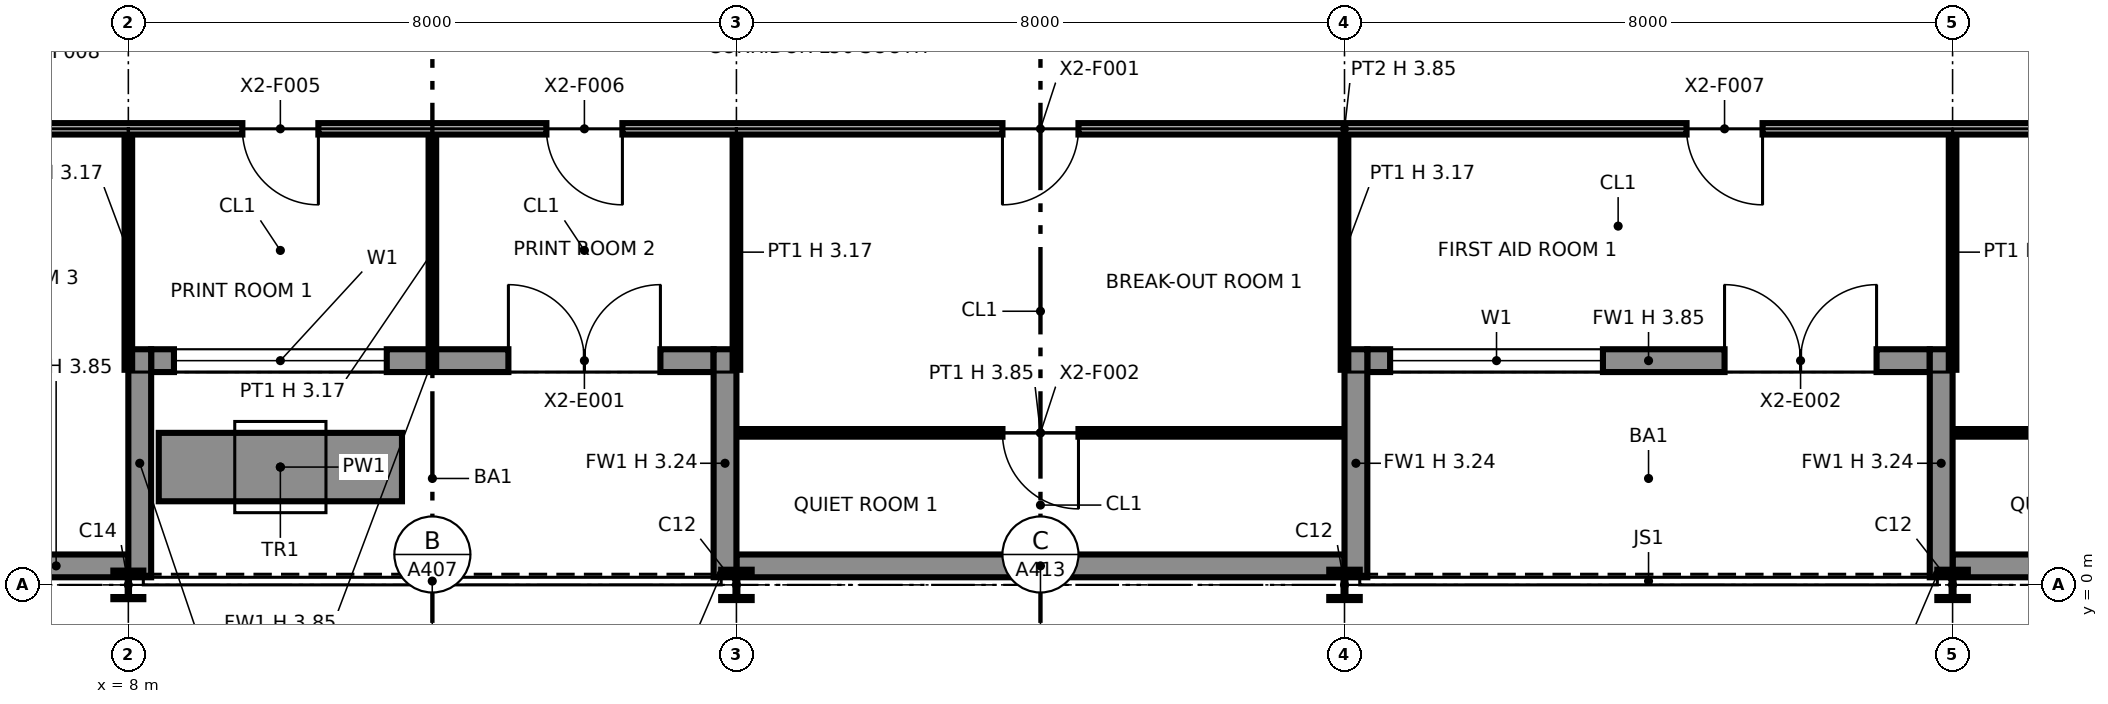
"""IFC4 building model, lengths in metres.
Left out: names, types, materials, properties, quantities, classifications, styles, units other than length and angle.
Written with IfcOpenShell. Run it as: python <this file> out.ifc"""

import sys

from ifc_helpers import new_model, si_unit, direction, frame, frame_2d, origin, origin_2d, place, context, subcontext, project, spatial, rectangle, i_section, extrude, element, fill, save


model = new_model("IFC4")
c1 = context("Model", 3, precision=1e-05, world=origin(), true_north=direction((0.0, 1.0)))
c2 = subcontext(c1, "Body", "Model", "MODEL_VIEW")
j1 = project(units=[si_unit("LENGTHUNIT", "METRE"), si_unit("PLANEANGLEUNIT", "RADIAN")], contexts=[c1])
p1 = place(None, origin())
s1 = spatial("IfcSite", under=j1, at=p1, CompositionType="ELEMENT")
p2 = place(p1, origin())
s2 = spatial("IfcBuilding", under=s1, at=p2, CompositionType="ELEMENT")
p3 = place(p2, frame((0.0, 0.0, 259.0)))
s3 = spatial("IfcBuildingStorey", under=s2, at=p3, CompositionType="ELEMENT", Elevation=259.0)
p4 = place(p3, frame((8.0, 0.0, 0.0), z_axis=(0.0, 0.0, 1.0), x_axis=(1.0, 0.0, 0.0)))
e1 = element("IfcColumn", 1, at=p4, inside=s3, PredefinedType="COLUMN", context=c2, shape_type="SweptSolid", body=[
    extrude(i_section(OverallWidth=0.394, OverallDepth=0.376, WebThickness=0.017, FlangeThickness=0.028, at=origin_2d()), origin(), (0.0, 0.0, 1.0), 3.85),
])
for number, where, z_axis, x_axis in (
    (2, (16.0, 0.0, 0.0), (0.0, 0.0, 1.0), (1.0, 0.0, 0.0)),
    (3, (24.0, 0.0, 0.0), (0.0, 0.0, 1.0), (1.0, 0.0, 0.0)),
    (4, (32.0, 0.0, 0.0), (0.0, 0.0, 1.0), (1.0, 0.0, 0.0)),
):
    element("IfcColumn", number, at=place(p3, frame(where, z_axis=z_axis, x_axis=x_axis)), inside=s3, PredefinedType="COLUMN", context=c2, shape_type="SweptSolid", body=[
        extrude(i_section(OverallWidth=0.401, OverallDepth=0.399, WebThickness=0.025, FlangeThickness=0.04, at=origin_2d()), origin(), (0.0, 0.0, 1.0), 3.85),
    ])
p5 = place(p3, frame((6.1, 0.25, 0.0), z_axis=(0.0, 0.0, 1.0), x_axis=(1.0, 0.0, 0.0)))
e5 = element("IfcWall", 5, at=p5, inside=s3, PredefinedType="SOLIDWALL", context=c2, shape_type="SweptSolid", body=[
    extrude(rectangle(XDim=1.9, YDim=0.3, at=frame_2d((0.95, 0.0))), origin(), (0.0, 0.0, 1.0), 3.85),
])
p6 = place(p3, frame((8.3, 2.95, 0.0), z_axis=(0.0, 0.0, 1.0), x_axis=(1.0, 0.0, 0.0)))
e6 = element("IfcWall", 6, at=p6, inside=s3, PredefinedType="SOLIDWALL", context=c2, shape_type="SweptSolid", body=[
    extrude(rectangle(XDim=7.4, YDim=0.3, at=frame_2d((3.7, 0.0))), origin(), (0.0, 0.0, 1.0), 3.85),
])
p7 = place(p6, frame((0.3, 0.0, 0.9)))
e7 = element("IfcOpeningElement", 7, at=p7, cuts=e6, PredefinedType="OPENING", context=c2, shape_type="SweptSolid", body=[
    extrude(rectangle(XDim=2.8, YDim=2.2, at=frame_2d((1.4, 1.1))), frame((0.0, 0.16, 0.0), z_axis=(0.0, -1.0, 0.0), x_axis=(1.0, 0.0, 0.0)), (0.0, 0.0, 1.0), 0.32),
])
p8 = place(p6, frame((4.7, 0.0, 0.0)))
e8 = element("IfcOpeningElement", 8, at=p8, cuts=e6, PredefinedType="OPENING", context=c2, shape_type="SweptSolid", body=[
    extrude(rectangle(XDim=2.0, YDim=2.4, at=frame_2d((1.0, 1.2))), frame((0.0, 0.16, 0.0), z_axis=(0.0, -1.0, 0.0), x_axis=(1.0, 0.0, 0.0)), (0.0, 0.0, 1.0), 0.32),
])
p9 = place(p3, frame((8.15, 0.1, 0.0), z_axis=(0.0, 0.0, 1.0), x_axis=(0.0, 1.0, 0.0)))
e9 = element("IfcWall", 9, at=p9, inside=s3, PredefinedType="SOLIDWALL", context=c2, shape_type="SweptSolid", body=[
    extrude(rectangle(XDim=3.0, YDim=0.3, at=frame_2d((1.5, 0.0))), origin(), (0.0, 0.0, 1.0), 3.171),
])
p10 = place(p3, frame((15.85, 0.1, 0.0), z_axis=(0.0, 0.0, 1.0), x_axis=(0.0, 1.0, 0.0)))
e10 = element("IfcWall", 10, at=p10, inside=s3, PredefinedType="SOLIDWALL", context=c2, shape_type="SweptSolid", body=[
    extrude(rectangle(XDim=3.0, YDim=0.3, at=frame_2d((1.5, 0.0))), origin(), (0.0, 0.0, 1.0), 3.237),
])
p11 = place(p3, frame((16.0, 0.25, 0.0), z_axis=(0.0, 0.0, 1.0), x_axis=(1.0, 0.0, 0.0)))
e11 = element("IfcWall", 11, at=p11, inside=s3, PredefinedType="SOLIDWALL", context=c2, shape_type="SweptSolid", body=[
    extrude(rectangle(XDim=8.0, YDim=0.3, at=frame_2d((4.0, 0.0))), origin(), (0.0, 0.0, 1.0), 3.85),
])
p12 = place(p3, frame((24.3, 2.95, 0.0), z_axis=(0.0, 0.0, 1.0), x_axis=(1.0, 0.0, 0.0)))
e12 = element("IfcWall", 12, at=p12, inside=s3, PredefinedType="SOLIDWALL", context=c2, shape_type="SweptSolid", body=[
    extrude(rectangle(XDim=7.4, YDim=0.3, at=frame_2d((3.7, 0.0))), origin(), (0.0, 0.0, 1.0), 3.85),
])
p13 = place(p12, frame((0.3, 0.0, 0.9)))
e13 = element("IfcOpeningElement", 13, at=p13, cuts=e12, PredefinedType="OPENING", context=c2, shape_type="SweptSolid", body=[
    extrude(rectangle(XDim=2.8, YDim=2.2, at=frame_2d((1.4, 1.1))), frame((0.0, 0.16, 0.0), z_axis=(0.0, -1.0, 0.0), x_axis=(1.0, 0.0, 0.0)), (0.0, 0.0, 1.0), 0.32),
])
p14 = place(p12, frame((4.7, 0.0, 0.0)))
e14 = element("IfcOpeningElement", 14, at=p14, cuts=e12, PredefinedType="OPENING", context=c2, shape_type="SweptSolid", body=[
    extrude(rectangle(XDim=2.0, YDim=2.4, at=frame_2d((1.0, 1.2))), frame((0.0, 0.16, 0.0), z_axis=(0.0, -1.0, 0.0), x_axis=(1.0, 0.0, 0.0)), (0.0, 0.0, 1.0), 0.32),
])
for number, where, z_axis, x_axis in (
    (15, (24.15, 0.1, 0.0), (0.0, 0.0, 1.0), (0.0, 1.0, 0.0)),
    (16, (31.85, 0.1, 0.0), (0.0, 0.0, 1.0), (0.0, 1.0, 0.0)),
):
    element("IfcWall", number, at=place(p3, frame(where, z_axis=z_axis, x_axis=x_axis)), inside=s3, PredefinedType="SOLIDWALL", context=c2, shape_type="SweptSolid", body=[
        extrude(rectangle(XDim=3.0, YDim=0.3, at=frame_2d((1.5, 0.0))), origin(), (0.0, 0.0, 1.0), 3.237),
    ])
p15 = place(p3, frame((32.0, 0.25, 0.0), z_axis=(0.0, 0.0, 1.0), x_axis=(1.0, 0.0, 0.0)))
e17 = element("IfcWall", 17, at=p15, inside=s3, PredefinedType="SOLIDWALL", context=c2, shape_type="SweptSolid", body=[
    extrude(rectangle(XDim=9.9, YDim=0.3, at=frame_2d((4.95, 0.0))), origin(), (0.0, 0.0, 1.0), 3.85),
])
p16 = place(p3, frame((8.4, 1.55, 0.0), z_axis=(0.0, 0.0, 1.0), x_axis=(1.0, 0.0, 0.0)))
e18 = element("IfcWall", 18, at=p16, inside=s3, PredefinedType="SOLIDWALL", context=c2, shape_type="SweptSolid", body=[
    extrude(rectangle(XDim=3.2, YDim=0.9, at=frame_2d((1.6, 0.0))), origin(), (0.0, 0.0, 1.0), 0.6),
])
p17 = place(p3, frame((16.03, 2.0, 0.0), z_axis=(0.0, 0.0, 1.0), x_axis=(1.0, 0.0, 0.0)))
e19 = element("IfcWall", 19, at=p17, inside=s3, PredefinedType="PARTITIONING", context=c2, shape_type="SweptSolid", body=[
    extrude(rectangle(XDim=7.94, YDim=0.1, at=frame_2d((3.97, 0.0))), origin(), (0.0, 0.0, 1.0), 3.85),
])
p18 = place(p17, frame((4.47, 0.0, 0.0), z_axis=(0.0, 0.0, 1.0), x_axis=(-1.0, 0.0, 0.0)))
e20 = element("IfcOpeningElement", 20, at=p18, cuts=e19, PredefinedType="OPENING", context=c2, shape_type="SweptSolid", body=[
    extrude(rectangle(XDim=1.0, YDim=2.1, at=frame_2d((0.5, 1.05))), frame((0.0, 0.06, 0.0), z_axis=(0.0, -1.0, 0.0), x_axis=(1.0, 0.0, 0.0)), (0.0, 0.0, 1.0), 0.12),
])
p19 = place(p3, frame((32.03, 2.0, 0.0), z_axis=(0.0, 0.0, 1.0), x_axis=(1.0, 0.0, 0.0)))
e21 = element("IfcWall", 21, at=p19, inside=s3, PredefinedType="PARTITIONING", context=c2, shape_type="SweptSolid", body=[
    extrude(rectangle(XDim=7.92, YDim=0.1, at=frame_2d((3.96, 0.0))), origin(), (0.0, 0.0, 1.0), 3.85),
])
p20 = place(p19, frame((4.47, 0.0, 0.0), z_axis=(0.0, 0.0, 1.0), x_axis=(-1.0, 0.0, 0.0)))
e22 = element("IfcOpeningElement", 22, at=p20, cuts=e21, PredefinedType="OPENING", context=c2, shape_type="SweptSolid", body=[
    extrude(rectangle(XDim=1.0, YDim=2.1, at=frame_2d((0.5, 1.05))), frame((0.0, 0.06, 0.0), z_axis=(0.0, -1.0, 0.0), x_axis=(1.0, 0.0, 0.0)), (0.0, 0.0, 1.0), 0.12),
])
for number, where, z_axis, x_axis in (
    (23, (8.0, 2.83, 0.0), (0.0, 0.0, 1.0), (0.0, 1.0, 0.0)),
    (24, (12.0, 2.83, 0.0), (0.0, 0.0, 1.0), (0.0, 1.0, 0.0)),
    (25, (16.0, 2.83, 0.0), (0.0, 0.0, 1.0), (0.0, 1.0, 0.0)),
    (26, (24.0, 2.83, 0.0), (0.0, 0.0, 1.0), (0.0, 1.0, 0.0)),
    (27, (32.0, 2.83, 0.0), (0.0, 0.0, 1.0), (0.0, 1.0, 0.0)),
):
    element("IfcWall", number, at=place(p3, frame(where, z_axis=z_axis, x_axis=x_axis)), inside=s3, PredefinedType="PARTITIONING", context=c2, shape_type="SweptSolid", body=[
        extrude(rectangle(XDim=3.095, YDim=0.1, at=frame_2d((1.547, 0.0))), origin(), (0.0, 0.0, 1.0), 3.172),
    ])
p21 = place(p3, frame((6.075, 6.0, 0.0), z_axis=(0.0, 0.0, 1.0), x_axis=(1.0, 0.0, 0.0)))
e28 = element("IfcWall", 28, at=p21, inside=s3, PredefinedType="PARTITIONING", context=c2, shape_type="SweptSolid", body=[
    extrude(rectangle(XDim=35.85, YDim=0.15, at=frame_2d((17.925, 0.0))), origin(), (0.0, 0.0, 1.0), 3.85),
])
p22 = place(p21, frame((14.425, 0.0, 0.0), z_axis=(0.0, 0.0, 1.0), x_axis=(-1.0, 0.0, 0.0)))
e29 = element("IfcOpeningElement", 29, at=p22, cuts=e28, PredefinedType="OPENING", context=c2, shape_type="SweptSolid", body=[
    extrude(rectangle(XDim=1.0, YDim=2.1, at=frame_2d((0.5, 1.05))), frame((0.0, 0.085, 0.0), z_axis=(0.0, -1.0, 0.0), x_axis=(1.0, 0.0, 0.0)), (0.0, 0.0, 1.0), 0.17),
])
p23 = place(p21, frame((30.425, 0.0, 0.0), z_axis=(0.0, 0.0, 1.0), x_axis=(-1.0, 0.0, 0.0)))
e30 = element("IfcOpeningElement", 30, at=p23, cuts=e28, PredefinedType="OPENING", context=c2, shape_type="SweptSolid", body=[
    extrude(rectangle(XDim=1.0, YDim=2.1, at=frame_2d((0.5, 1.05))), frame((0.0, 0.085, 0.0), z_axis=(0.0, -1.0, 0.0), x_axis=(1.0, 0.0, 0.0)), (0.0, 0.0, 1.0), 0.17),
])
p24 = place(p21, frame((4.425, 0.0, 0.0), z_axis=(0.0, 0.0, 1.0), x_axis=(-1.0, 0.0, 0.0)))
e31 = element("IfcOpeningElement", 31, at=p24, cuts=e28, PredefinedType="OPENING", context=c2, shape_type="SweptSolid", body=[
    extrude(rectangle(XDim=1.0, YDim=2.1, at=frame_2d((0.5, 1.05))), frame((0.0, 0.085, 0.0), z_axis=(0.0, -1.0, 0.0), x_axis=(1.0, 0.0, 0.0)), (0.0, 0.0, 1.0), 0.17),
])
p25 = place(p21, frame((8.425, 0.0, 0.0), z_axis=(0.0, 0.0, 1.0), x_axis=(-1.0, 0.0, 0.0)))
e32 = element("IfcOpeningElement", 32, at=p25, cuts=e28, PredefinedType="OPENING", context=c2, shape_type="SweptSolid", body=[
    extrude(rectangle(XDim=1.0, YDim=2.1, at=frame_2d((0.5, 1.05))), frame((0.0, 0.085, 0.0), z_axis=(0.0, -1.0, 0.0), x_axis=(1.0, 0.0, 0.0)), (0.0, 0.0, 1.0), 0.17),
])
p26 = place(p21, frame((23.425, 0.0, 0.0), z_axis=(0.0, 0.0, 1.0), x_axis=(-1.0, 0.0, 0.0)))
e33 = element("IfcOpeningElement", 33, at=p26, cuts=e28, PredefinedType="OPENING", context=c2, shape_type="SweptSolid", body=[
    extrude(rectangle(XDim=1.0, YDim=2.1, at=frame_2d((0.5, 1.05))), frame((0.0, 0.085, 0.0), z_axis=(0.0, -1.0, 0.0), x_axis=(1.0, 0.0, 0.0)), (0.0, 0.0, 1.0), 0.17),
])
p27 = place(p21, frame((35.425, 0.0, 0.0), z_axis=(0.0, 0.0, 1.0), x_axis=(-1.0, 0.0, 0.0)))
e34 = element("IfcOpeningElement", 34, at=p27, cuts=e28, PredefinedType="OPENING", context=c2, shape_type="SweptSolid", body=[
    extrude(rectangle(XDim=1.0, YDim=2.1, at=frame_2d((0.5, 1.05))), frame((0.0, 0.085, 0.0), z_axis=(0.0, -1.0, 0.0), x_axis=(1.0, 0.0, 0.0)), (0.0, 0.0, 1.0), 0.17),
])
p28 = place(p7, origin())
e35 = element("IfcWindow", 35, at=p28, inside=s3, PartitioningType="SINGLE_PANEL", PredefinedType="WINDOW", context=c2, shape_type="SweptSolid", body=[
    extrude(rectangle(XDim=2.8, YDim=2.2, at=frame_2d((1.4, 1.1))), frame((0.0, 0.03, 0.0), z_axis=(0.0, -1.0, 0.0), x_axis=(1.0, 0.0, 0.0)), (0.0, 0.0, 1.0), 0.06),
])
fill(e7, e35)
p29 = place(p8, origin())
e36 = element("IfcDoor", 36, at=p29, inside=s3, OperationType="DOUBLE_DOOR_SINGLE_SWING", PredefinedType="DOOR", context=c2, shape_type="SweptSolid", body=[
    extrude(rectangle(XDim=2.0, YDim=2.4, at=frame_2d((1.0, 1.2))), frame((0.0, 0.025, 0.0), z_axis=(0.0, -1.0, 0.0), x_axis=(1.0, 0.0, 0.0)), (0.0, 0.0, 1.0), 0.05),
])
fill(e8, e36)
p30 = place(p13, origin())
e37 = element("IfcWindow", 37, at=p30, inside=s3, PartitioningType="SINGLE_PANEL", PredefinedType="WINDOW", context=c2, shape_type="SweptSolid", body=[
    extrude(rectangle(XDim=2.8, YDim=2.2, at=frame_2d((1.4, 1.1))), frame((0.0, 0.03, 0.0), z_axis=(0.0, -1.0, 0.0), x_axis=(1.0, 0.0, 0.0)), (0.0, 0.0, 1.0), 0.06),
])
fill(e13, e37)
p31 = place(p14, origin())
e38 = element("IfcDoor", 38, at=p31, inside=s3, OperationType="DOUBLE_DOOR_SINGLE_SWING", PredefinedType="DOOR", context=c2, shape_type="SweptSolid", body=[
    extrude(rectangle(XDim=2.0, YDim=2.4, at=frame_2d((1.0, 1.2))), frame((0.0, 0.025, 0.0), z_axis=(0.0, -1.0, 0.0), x_axis=(1.0, 0.0, 0.0)), (0.0, 0.0, 1.0), 0.05),
])
fill(e14, e38)
p32 = place(p22, origin())
e39 = element("IfcDoor", 39, at=p32, inside=s3, OperationType="SINGLE_SWING_RIGHT", PredefinedType="DOOR", context=c2, shape_type="SweptSolid", body=[
    extrude(rectangle(XDim=1.0, YDim=2.1, at=frame_2d((0.5, 1.05))), frame((0.0, 0.025, 0.0), z_axis=(0.0, -1.0, 0.0), x_axis=(1.0, 0.0, 0.0)), (0.0, 0.0, 1.0), 0.05),
])
fill(e29, e39)
p33 = place(p18, origin())
e40 = element("IfcDoor", 40, at=p33, inside=s3, OperationType="SINGLE_SWING_LEFT", PredefinedType="DOOR", context=c2, shape_type="SweptSolid", body=[
    extrude(rectangle(XDim=1.0, YDim=2.1, at=frame_2d((0.5, 1.05))), frame((0.0, 0.025, 0.0), z_axis=(0.0, -1.0, 0.0), x_axis=(1.0, 0.0, 0.0)), (0.0, 0.0, 1.0), 0.05),
])
fill(e20, e40)
p34 = place(p24, origin())
e41 = element("IfcDoor", 41, at=p34, inside=s3, OperationType="SINGLE_SWING_LEFT", PredefinedType="DOOR", context=c2, shape_type="SweptSolid", body=[
    extrude(rectangle(XDim=1.0, YDim=2.1, at=frame_2d((0.5, 1.05))), frame((0.0, 0.025, 0.0), z_axis=(0.0, -1.0, 0.0), x_axis=(1.0, 0.0, 0.0)), (0.0, 0.0, 1.0), 0.05),
])
fill(e31, e41)
p35 = place(p25, origin())
e42 = element("IfcDoor", 42, at=p35, inside=s3, OperationType="SINGLE_SWING_LEFT", PredefinedType="DOOR", context=c2, shape_type="SweptSolid", body=[
    extrude(rectangle(XDim=1.0, YDim=2.1, at=frame_2d((0.5, 1.05))), frame((0.0, 0.025, 0.0), z_axis=(0.0, -1.0, 0.0), x_axis=(1.0, 0.0, 0.0)), (0.0, 0.0, 1.0), 0.05),
])
fill(e32, e42)
p36 = place(p26, origin())
e43 = element("IfcDoor", 43, at=p36, inside=s3, OperationType="SINGLE_SWING_LEFT", PredefinedType="DOOR", context=c2, shape_type="SweptSolid", body=[
    extrude(rectangle(XDim=1.0, YDim=2.1, at=frame_2d((0.5, 1.05))), frame((0.0, 0.025, 0.0), z_axis=(0.0, -1.0, 0.0), x_axis=(1.0, 0.0, 0.0)), (0.0, 0.0, 1.0), 0.05),
])
fill(e33, e43)
save(model, sys.argv[1])
